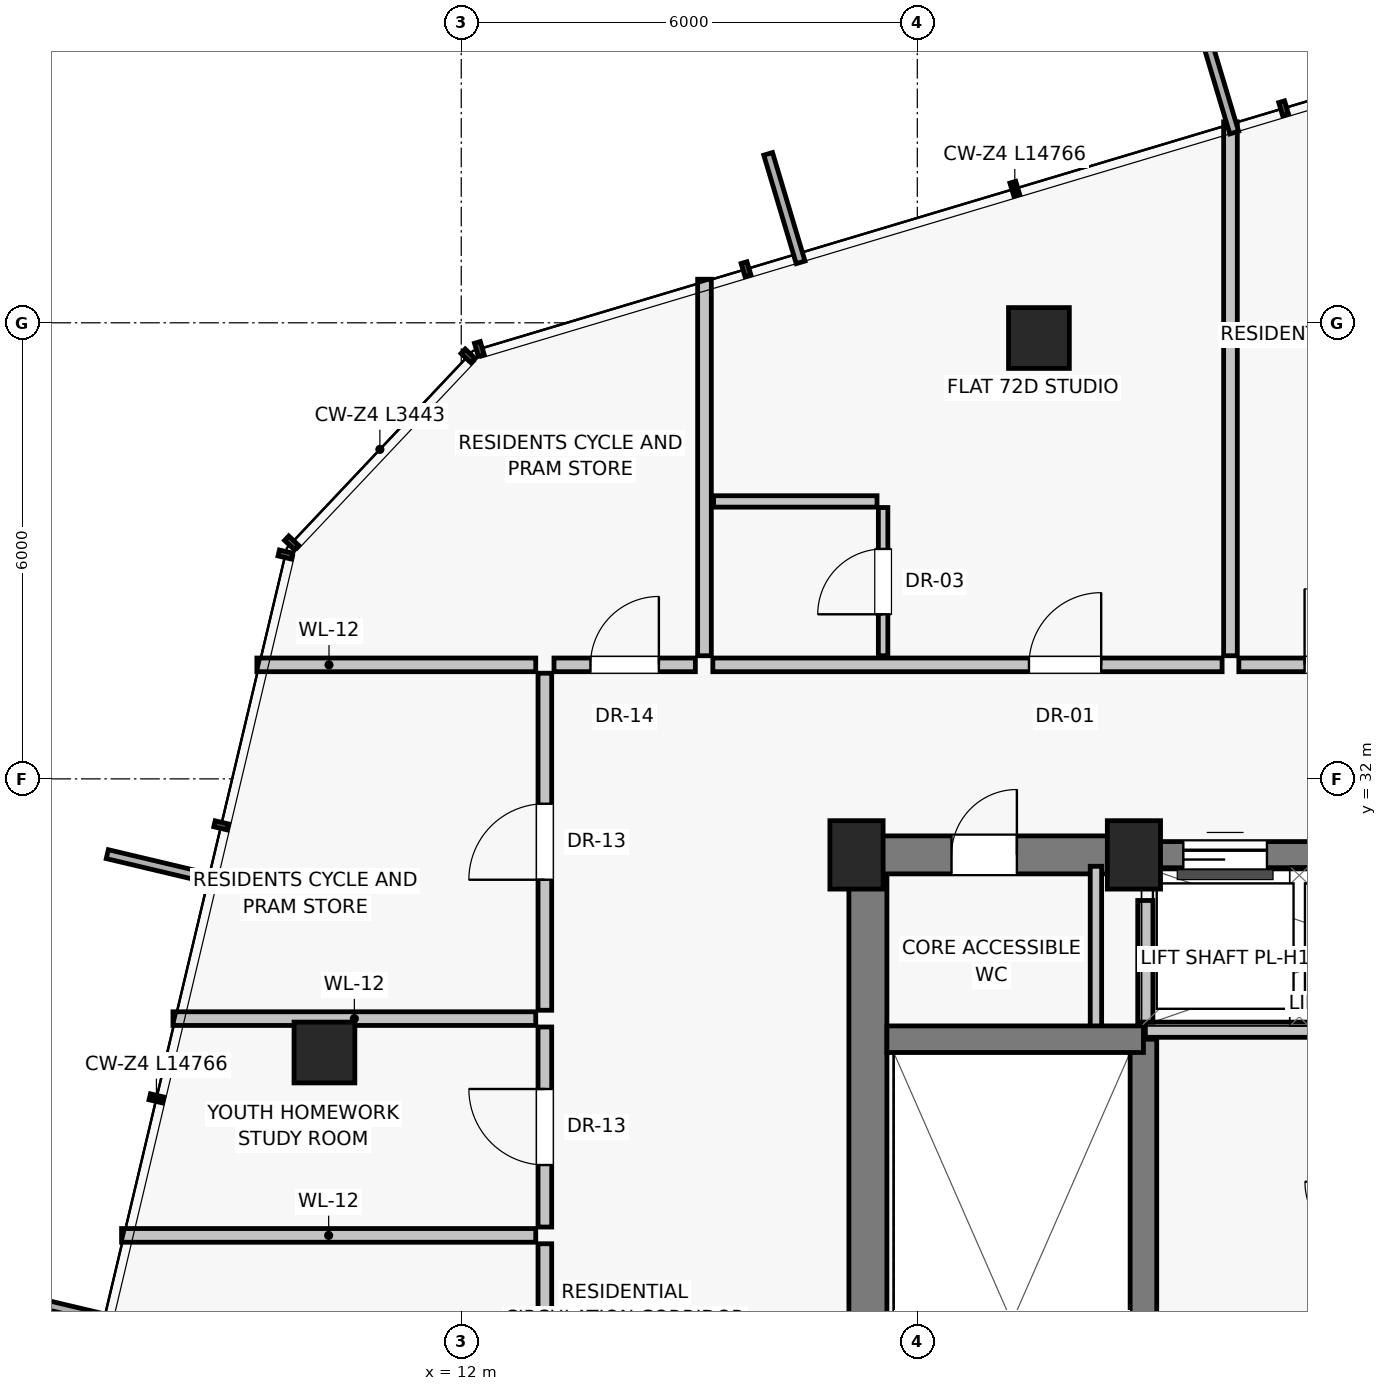
"""IFC4 building model, lengths in metres.
Left out: names, types, materials, properties, quantities, classifications, styles, units other than length and angle.
Written with IfcOpenShell. Run it as: python <this file> out.ifc"""

import sys

from ifc_helpers import new_model, si_unit, direction, frame, frame_2d, origin, origin_2d, place, context, subcontext, project, spatial, rectangle, extrude, source, transform, mapped, element, fill, save


model = new_model("IFC4")
c1 = context("Model", 3, precision=1e-05, world=origin(), true_north=direction((0.0, 1.0)))
c2 = subcontext(c1, "Body", "Model", "MODEL_VIEW")
j1 = project(units=[si_unit("LENGTHUNIT", "METRE"), si_unit("PLANEANGLEUNIT", "RADIAN")], contexts=[c1])
p1 = place(None, origin())
s1 = spatial("IfcSite", under=j1, at=p1, CompositionType="ELEMENT")
p2 = place(p1, origin())
s2 = spatial("IfcBuilding", under=s1, at=p2, CompositionType="ELEMENT")
p3 = place(p2, frame((0.0, 0.0, 254.5)))
s3 = spatial("IfcBuildingStorey", under=s2, at=p3, CompositionType="ELEMENT", Elevation=254.5)
for number, where, z_axis, x_axis in (
    (1, (17.2, 31.0, 0.0), (0.0, 0.0, 1.0), (1.0, 0.0, 0.0)),
    (2, (20.85, 31.0, 0.0), (0.0, 0.0, 1.0), (1.0, 0.0, 0.0)),
):
    element("IfcColumn", number, at=place(p3, frame(where, z_axis=z_axis, x_axis=x_axis)), inside=s3, PredefinedType="PILASTER", context=c2, shape_type="SweptSolid", body=[
        extrude(rectangle(XDim=0.7, YDim=0.9, at=origin_2d()), origin(), (0.0, 0.0, 1.0), 3.25),
    ])
for number, where, z_axis, x_axis in (
    (3, (19.6, 37.8, 0.0), (0.0, 0.0, 1.0), (1.0, 0.0, 0.0)),
    (4, (10.2, 28.4, 0.0), (0.0, 0.0, 1.0), (1.0, 0.0, 0.0)),
):
    element("IfcColumn", number, at=place(p3, frame(where, z_axis=z_axis, x_axis=x_axis)), inside=s3, PredefinedType="COLUMN", context=c2, shape_type="SweptSolid", body=[
        extrude(rectangle(XDim=0.8, YDim=0.8, at=origin_2d()), origin(), (0.0, 0.0, 1.0), 3.25),
    ])
p4 = place(p3, frame((17.35, 16.8, 0.0), z_axis=(0.0, 0.0, 1.0), x_axis=(0.0, 1.0, 0.0)))
e5 = element("IfcWall", 5, at=p4, inside=s3, PredefinedType="SHEAR", context=c2, shape_type="SweptSolid", body=[
    extrude(rectangle(XDim=14.2, YDim=0.5, at=frame_2d((7.1, 0.0))), origin(), (0.0, 0.0, 1.0), 3.015),
])
p5 = place(p3, frame((17.2, 31.0, 0.0), z_axis=(0.0, 0.0, 1.0), x_axis=(1.0, 0.0, 0.0)))
e6 = element("IfcWall", 6, at=p5, inside=s3, PredefinedType="SHEAR", context=c2, shape_type="SweptSolid", body=[
    extrude(rectangle(XDim=3.8, YDim=0.5, at=frame_2d((1.9, 0.0))), origin(), (0.0, 0.0, 1.0), 3.015),
])
p6 = place(p5, frame((1.25, 0.0, 0.0)))
e7 = element("IfcOpeningElement", 7, at=p6, cuts=e6, PredefinedType="OPENING", context=c2, shape_type="SweptSolid", body=[
    extrude(rectangle(XDim=0.86, YDim=2.01, at=frame_2d((0.43, 1.005))), frame((0.0, 0.26, 0.0), z_axis=(0.0, -1.0, 0.0), x_axis=(1.0, 0.0, 0.0)), (0.0, 0.0, 1.0), 0.52),
])
p7 = place(p3, frame((21.0, 31.0, 0.0), z_axis=(0.0, 0.0, 1.0), x_axis=(1.0, 0.0, 0.0)))
e8 = element("IfcWall", 8, at=p7, inside=s3, PredefinedType="SHEAR", context=c2, shape_type="SweptSolid", body=[
    extrude(rectangle(XDim=6.0, YDim=0.35, at=frame_2d((3.0, 0.0))), origin(), (0.0, 0.0, 1.0), 3.015),
])
p8 = place(p7, frame((0.5, 0.0, 0.0)))
e9 = element("IfcOpeningElement", 9, at=p8, cuts=e8, PredefinedType="OPENING", context=c2, shape_type="SweptSolid", body=[
    extrude(rectangle(XDim=1.1, YDim=2.08, at=frame_2d((0.55, 1.04))), frame((0.0, 0.185, 0.0), z_axis=(0.0, -1.0, 0.0), x_axis=(1.0, 0.0, 0.0)), (0.0, 0.0, 1.0), 0.37),
])
p9 = place(p7, frame((2.45, 0.0, 0.0)))
e10 = element("IfcOpeningElement", 10, at=p9, cuts=e8, PredefinedType="OPENING", context=c2, shape_type="SweptSolid", body=[
    extrude(rectangle(XDim=1.1, YDim=2.08, at=frame_2d((0.55, 1.04))), frame((0.0, 0.185, 0.0), z_axis=(0.0, -1.0, 0.0), x_axis=(1.0, 0.0, 0.0)), (0.0, 0.0, 1.0), 0.37),
])
p10 = place(p7, frame((4.4, 0.0, 0.0)))
e11 = element("IfcOpeningElement", 11, at=p10, cuts=e8, PredefinedType="OPENING", context=c2, shape_type="SweptSolid", body=[
    extrude(rectangle(XDim=1.1, YDim=2.08, at=frame_2d((0.55, 1.04))), frame((0.0, 0.185, 0.0), z_axis=(0.0, -1.0, 0.0), x_axis=(1.0, 0.0, 0.0)), (0.0, 0.0, 1.0), 0.37),
])
p11 = place(p3, frame((20.35, 28.65, 0.0), z_axis=(0.0, 0.0, 1.0), x_axis=(0.0, 1.0, 0.0)))
e12 = element("IfcWall", 12, at=p11, inside=s3, PredefinedType="PARTITIONING", context=c2, shape_type="SweptSolid", body=[
    extrude(rectangle(XDim=2.2, YDim=0.15, at=frame_2d((1.1, 0.0))), origin(), (0.0, 0.0, 1.0), 3.015),
])
p12 = place(p3, frame((20.975, 19.8, 0.0), z_axis=(0.0, 0.0, 1.0), x_axis=(0.0, 1.0, 0.0)))
e13 = element("IfcWall", 13, at=p12, inside=s3, PredefinedType="SHEAR", context=c2, shape_type="SweptSolid", body=[
    extrude(rectangle(XDim=8.775, YDim=0.35, at=frame_2d((4.387, 0.0))), origin(), (0.0, 0.0, 1.0), 3.015),
])
p13 = place(p3, frame((17.6, 28.575, 0.0), z_axis=(0.0, 0.0, 1.0), x_axis=(1.0, 0.0, 0.0)))
e14 = element("IfcWall", 14, at=p13, inside=s3, PredefinedType="SHEAR", context=c2, shape_type="SweptSolid", body=[
    extrude(rectangle(XDim=3.375, YDim=0.35, at=frame_2d((1.688, 0.0))), origin(), (0.0, 0.0, 1.0), 3.015),
])
p14 = place(p3, frame((21.0, 28.7, 0.0), z_axis=(0.0, 0.0, 1.0), x_axis=(1.0, 0.0, 0.0)))
e15 = element("IfcWall", 15, at=p14, inside=s3, PredefinedType="SOLIDWALL", context=c2, shape_type="SweptSolid", body=[
    extrude(rectangle(XDim=6.0, YDim=0.2, at=frame_2d((3.0, 0.0))), origin(), (0.0, 0.0, 1.0), 3.015),
])
p15 = place(p3, frame((21.0, 28.8, 0.0), z_axis=(0.0, 0.0, 1.0), x_axis=(0.0, 1.0, 0.0)))
e16 = element("IfcWall", 16, at=p15, inside=s3, PredefinedType="SOLIDWALL", context=c2, shape_type="SweptSolid", body=[
    extrude(rectangle(XDim=1.6, YDim=0.2, at=frame_2d((0.8, 0.0))), origin(), (0.0, 0.0, 1.0), 3.015),
])
p16 = place(p3, frame((15.2, 33.62, 0.0), z_axis=(0.0, 0.0, 1.0), x_axis=(0.0, 1.0, 0.0)))
e17 = element("IfcWall", 17, at=p16, inside=s3, PredefinedType="PARTITIONING", context=c2, shape_type="SweptSolid", body=[
    extrude(rectangle(XDim=4.953, YDim=0.18, at=frame_2d((2.477, 0.0))), origin(), (0.0, 0.0, 1.0), 3.015),
])
p17 = place(p3, frame((22.23, 33.5, 0.0), z_axis=(0.0, 0.0, 1.0), x_axis=(1.0, 0.0, 0.0)))
e18 = element("IfcWall", 18, at=p17, inside=s3, PredefinedType="PARTITIONING", context=c2, shape_type="SweptSolid", body=[
    extrude(rectangle(XDim=2.73, YDim=0.18, at=frame_2d((1.365, 0.0))), origin(), (0.0, 0.0, 1.0), 3.015),
])
p18 = place(p17, frame((0.865, 0.0, 0.0)))
e19 = element("IfcOpeningElement", 19, at=p18, cuts=e18, PredefinedType="OPENING", context=c2, shape_type="SweptSolid", body=[
    extrude(rectangle(XDim=1.0, YDim=2.01, at=frame_2d((0.5, 1.005))), frame((0.0, 0.1, 0.0), z_axis=(0.0, -1.0, 0.0), x_axis=(1.0, 0.0, 0.0)), (0.0, 0.0, 1.0), 0.2),
])
p19 = place(p3, frame((22.12, 33.62, 0.0), z_axis=(0.0, 0.0, 1.0), x_axis=(0.0, 1.0, 0.0)))
e20 = element("IfcWall", 20, at=p19, inside=s3, PredefinedType="PARTITIONING", context=c2, shape_type="SweptSolid", body=[
    extrude(rectangle(XDim=7.024, YDim=0.18, at=frame_2d((3.512, 0.0))), origin(), (0.0, 0.0, 1.0), 3.015),
])
p20 = place(p3, frame((15.31, 33.5, 0.0), z_axis=(0.0, 0.0, 1.0), x_axis=(1.0, 0.0, 0.0)))
e21 = element("IfcWall", 21, at=p20, inside=s3, PredefinedType="PARTITIONING", context=c2, shape_type="SweptSolid", body=[
    extrude(rectangle(XDim=6.7, YDim=0.18, at=frame_2d((3.35, 0.0))), origin(), (0.0, 0.0, 1.0), 3.015),
])
p21 = place(p20, frame((4.159, 0.0, 0.0)))
e22 = element("IfcOpeningElement", 22, at=p21, cuts=e21, PredefinedType="OPENING", context=c2, shape_type="SweptSolid", body=[
    extrude(rectangle(XDim=0.95, YDim=2.02, at=frame_2d((0.475, 1.01))), frame((0.0, 0.1, 0.0), z_axis=(0.0, -1.0, 0.0), x_axis=(1.0, 0.0, 0.0)), (0.0, 0.0, 1.0), 0.2),
])
p22 = place(p3, frame((17.55, 33.62, 0.0), z_axis=(0.0, 0.0, 1.0), x_axis=(0.0, 1.0, 0.0)))
e23 = element("IfcWall", 23, at=p22, inside=s3, PredefinedType="PARTITIONING", context=c2, shape_type="SweptSolid", body=[
    extrude(rectangle(XDim=1.95, YDim=0.125, at=frame_2d((0.975, 0.0))), origin(), (0.0, 0.0, 1.0), 3.015),
])
p23 = place(p22, frame((0.545, 0.0, 0.0)))
e24 = element("IfcOpeningElement", 24, at=p23, cuts=e23, PredefinedType="OPENING", context=c2, shape_type="SweptSolid", body=[
    extrude(rectangle(XDim=0.86, YDim=2.01, at=frame_2d((0.43, 1.005))), frame((0.0, 0.073, 0.0), z_axis=(0.0, -1.0, 0.0), x_axis=(1.0, 0.0, 0.0)), (0.0, 0.0, 1.0), 0.145),
])
p24 = place(p3, frame((15.32, 35.65, 0.0), z_axis=(0.0, 0.0, 1.0), x_axis=(1.0, 0.0, 0.0)))
e25 = element("IfcWall", 25, at=p24, inside=s3, PredefinedType="PARTITIONING", context=c2, shape_type="SweptSolid", body=[
    extrude(rectangle(XDim=2.15, YDim=0.15, at=frame_2d((1.075, 0.0))), origin(), (0.0, 0.0, 1.0), 3.015),
])
p25 = place(p3, frame((12.98, 33.5, 0.0), z_axis=(0.0, 0.0, 1.0), x_axis=(-1.0, 0.0, 0.0)))
e26 = element("IfcWall", 26, at=p25, inside=s3, PredefinedType="PARTITIONING", context=c2, shape_type="SweptSolid", body=[
    extrude(rectangle(XDim=3.669, YDim=0.18, at=frame_2d((1.834, 0.0))), origin(), (0.0, 0.0, 1.0), 3.015),
])
p26 = place(p3, frame((13.1, 18.854, 0.0), z_axis=(0.0, 0.0, 1.0), x_axis=(0.0, 1.0, 0.0)))
e27 = element("IfcWall", 27, at=p26, inside=s3, PredefinedType="PARTITIONING", context=c2, shape_type="SweptSolid", body=[
    extrude(rectangle(XDim=7.03, YDim=0.18, at=frame_2d((3.515, 0.0))), origin(), (0.0, 0.0, 1.0), 2.662),
])
p27 = place(p26, frame((3.015, 0.0, 0.0)))
e28 = element("IfcOpeningElement", 28, at=p27, cuts=e27, PredefinedType="OPENING", context=c2, shape_type="SweptSolid", body=[
    extrude(rectangle(XDim=1.0, YDim=2.01, at=frame_2d((0.5, 1.005))), frame((0.0, 0.1, 0.0), z_axis=(0.0, -1.0, 0.0), x_axis=(1.0, 0.0, 0.0)), (0.0, 0.0, 1.0), 0.2),
])
p28 = place(p3, frame((12.98, 25.994, 0.0), z_axis=(0.0, 0.0, 1.0), x_axis=(-1.0, 0.0, 0.0)))
e29 = element("IfcWall", 29, at=p28, inside=s3, PredefinedType="PARTITIONING", context=c2, shape_type="SweptSolid", body=[
    extrude(rectangle(XDim=5.449, YDim=0.18, at=frame_2d((2.724, 0.0))), origin(), (0.0, 0.0, 1.0), 3.015),
])
p29 = place(p3, frame((13.1, 26.104, 0.0), z_axis=(0.0, 0.0, 1.0), x_axis=(0.0, 1.0, 0.0)))
e30 = element("IfcWall", 30, at=p29, inside=s3, PredefinedType="PARTITIONING", context=c2, shape_type="SweptSolid", body=[
    extrude(rectangle(XDim=2.632, YDim=0.18, at=frame_2d((1.316, 0.0))), origin(), (0.0, 0.0, 1.0), 2.662),
])
p30 = place(p29, frame((0.816, 0.0, 0.0)))
e31 = element("IfcOpeningElement", 31, at=p30, cuts=e30, PredefinedType="OPENING", context=c2, shape_type="SweptSolid", body=[
    extrude(rectangle(XDim=1.0, YDim=2.01, at=frame_2d((0.5, 1.005))), frame((0.0, 0.1, 0.0), z_axis=(0.0, -1.0, 0.0), x_axis=(1.0, 0.0, 0.0)), (0.0, 0.0, 1.0), 0.2),
])
p31 = place(p3, frame((13.1, 28.956, 0.0), z_axis=(0.0, 0.0, 1.0), x_axis=(0.0, 1.0, 0.0)))
e32 = element("IfcWall", 32, at=p31, inside=s3, PredefinedType="PARTITIONING", context=c2, shape_type="SweptSolid", body=[
    extrude(rectangle(XDim=4.434, YDim=0.18, at=frame_2d((2.217, 0.0))), origin(), (0.0, 0.0, 1.0), 2.662),
])
p32 = place(p31, frame((1.717, 0.0, 0.0)))
e33 = element("IfcOpeningElement", 33, at=p32, cuts=e32, PredefinedType="OPENING", context=c2, shape_type="SweptSolid", body=[
    extrude(rectangle(XDim=1.0, YDim=2.01, at=frame_2d((0.5, 1.005))), frame((0.0, 0.1, 0.0), z_axis=(0.0, -1.0, 0.0), x_axis=(1.0, 0.0, 0.0)), (0.0, 0.0, 1.0), 0.2),
])
p33 = place(p3, frame((12.98, 28.846, 0.0), z_axis=(0.0, 0.0, 1.0), x_axis=(-1.0, 0.0, 0.0)))
e34 = element("IfcWall", 34, at=p33, inside=s3, PredefinedType="PARTITIONING", context=c2, shape_type="SweptSolid", body=[
    extrude(rectangle(XDim=4.772, YDim=0.18, at=frame_2d((2.386, 0.0))), origin(), (0.0, 0.0, 1.0), 3.015),
])
p34 = place(p3, frame((13.22, 33.5, 0.0), z_axis=(0.0, 0.0, 1.0), x_axis=(1.0, 0.0, 0.0)))
e35 = element("IfcWall", 35, at=p34, inside=s3, PredefinedType="PARTITIONING", context=c2, shape_type="SweptSolid", body=[
    extrude(rectangle(XDim=1.86, YDim=0.18, at=frame_2d((0.93, 0.0))), origin(), (0.0, 0.0, 1.0), 3.015),
])
p35 = place(p34, frame((0.48, 0.0, 0.0)))
e36 = element("IfcOpeningElement", 36, at=p35, cuts=e35, PredefinedType="OPENING", context=c2, shape_type="SweptSolid", body=[
    extrude(rectangle(XDim=0.9, YDim=2.01, at=frame_2d((0.45, 1.005))), frame((0.0, 0.1, 0.0), z_axis=(0.0, -1.0, 0.0), x_axis=(1.0, 0.0, 0.0)), (0.0, 0.0, 1.0), 0.2),
])
m1 = source(origin(), c2, "Body", "SweptSolid", [
    extrude(rectangle(XDim=0.86, YDim=2.01, at=frame_2d((0.43, 1.005))), frame((0.0, 0.025, 0.0), z_axis=(0.0, -1.0, 0.0), x_axis=(1.0, 0.0, 0.0)), (0.0, 0.0, 1.0), 0.05),
])
p36 = place(p6, origin())
e37 = element("IfcDoor", 37, at=p36, inside=s3, OperationType="SINGLE_SWING_RIGHT", PredefinedType="DOOR", context=c2, shape_type="MappedRepresentation", body=[
    mapped(m1, transform((0.0, 0.0, 0.0), scale=1.0)),
])
fill(e7, e37)
m2 = source(origin(), c2, "Body", "SweptSolid", [
    extrude(rectangle(XDim=1.1, YDim=2.08, at=frame_2d((0.55, 1.04))), frame((0.0, 0.025, 0.0), z_axis=(0.0, -1.0, 0.0), x_axis=(1.0, 0.0, 0.0)), (0.0, 0.0, 1.0), 0.05),
])
p37 = place(p8, origin())
e38 = element("IfcDoor", 38, at=p37, inside=s3, OperationType="SLIDING_TO_LEFT", PredefinedType="DOOR", context=c2, shape_type="MappedRepresentation", body=[
    mapped(m2, transform((0.0, 0.0, 0.0), scale=1.0)),
])
fill(e9, e38)
m3 = source(origin(), c2, "Body", "SweptSolid", [
    extrude(rectangle(XDim=1.0, YDim=2.01, at=frame_2d((0.5, 1.005))), frame((0.0, 0.025, 0.0), z_axis=(0.0, -1.0, 0.0), x_axis=(1.0, 0.0, 0.0)), (0.0, 0.0, 1.0), 0.05),
])
p38 = place(p18, origin())
e39 = element("IfcDoor", 39, at=p38, inside=s3, OperationType="SINGLE_SWING_LEFT", PredefinedType="DOOR", context=c2, shape_type="MappedRepresentation", body=[
    mapped(m3, transform((0.0, 0.0, 0.0), scale=1.0)),
])
fill(e19, e39)
m4 = source(origin(), c2, "Body", "SweptSolid", [
    extrude(rectangle(XDim=0.95, YDim=2.02, at=frame_2d((0.475, 1.01))), frame((0.0, 0.025, 0.0), z_axis=(0.0, -1.0, 0.0), x_axis=(1.0, 0.0, 0.0)), (0.0, 0.0, 1.0), 0.05),
])
p39 = place(p21, origin())
e40 = element("IfcDoor", 40, at=p39, inside=s3, OperationType="SINGLE_SWING_RIGHT", PredefinedType="DOOR", context=c2, shape_type="MappedRepresentation", body=[
    mapped(m4, transform((0.0, 0.0, 0.0), scale=1.0)),
])
fill(e22, e40)
p40 = place(p23, origin())
e41 = element("IfcDoor", 41, at=p40, inside=s3, OperationType="SINGLE_SWING_LEFT", PredefinedType="DOOR", context=c2, shape_type="MappedRepresentation", body=[
    mapped(m1, transform((0.0, 0.0, 0.0), scale=1.0)),
])
fill(e24, e41)
p41 = place(p30, origin())
e42 = element("IfcDoor", 42, at=p41, inside=s3, OperationType="SINGLE_SWING_RIGHT", PredefinedType="DOOR", context=c2, shape_type="MappedRepresentation", body=[
    mapped(m3, transform((0.0, 0.0, 0.0), scale=1.0)),
])
fill(e31, e42)
p42 = place(p32, origin())
e43 = element("IfcDoor", 43, at=p42, inside=s3, OperationType="SINGLE_SWING_LEFT", PredefinedType="DOOR", context=c2, shape_type="MappedRepresentation", body=[
    mapped(m3, transform((0.0, 0.0, 0.0), scale=1.0)),
])
fill(e33, e43)
m5 = source(origin(), c2, "Body", "SweptSolid", [
    extrude(rectangle(XDim=0.9, YDim=2.01, at=frame_2d((0.45, 1.005))), frame((0.0, 0.025, 0.0), z_axis=(0.0, -1.0, 0.0), x_axis=(1.0, 0.0, 0.0)), (0.0, 0.0, 1.0), 0.05),
])
p43 = place(p35, origin())
e44 = element("IfcDoor", 44, at=p43, inside=s3, OperationType="SINGLE_SWING_RIGHT", PredefinedType="DOOR", context=c2, shape_type="MappedRepresentation", body=[
    mapped(m5, transform((0.0, 0.0, 0.0), scale=1.0)),
])
fill(e36, e44)
save(model, sys.argv[1])
